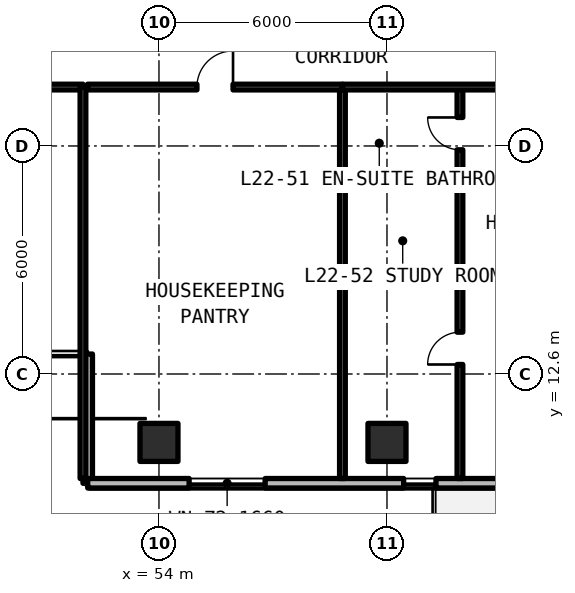
"""IFC4 building model, lengths in metres.
Left out: names, types, materials, properties, quantities, classifications, styles, units other than length and angle.
Written with IfcOpenShell. Run it as: python <this file> out.ifc"""

import sys

from ifc_helpers import new_model, si_unit, direction, frame, frame_2d, origin, origin_2d, place, context, subcontext, project, spatial, rectangle, extrude, element, fill, save


model = new_model("IFC4")
c1 = context("Model", 3, precision=1e-05, world=origin(), true_north=direction((0.0, 1.0)))
c2 = subcontext(c1, "Body", "Model", "MODEL_VIEW")
j1 = project(units=[si_unit("LENGTHUNIT", "METRE"), si_unit("PLANEANGLEUNIT", "RADIAN")], contexts=[c1])
p1 = place(None, origin())
s1 = spatial("IfcSite", under=j1, at=p1, CompositionType="ELEMENT")
p2 = place(p1, origin())
s2 = spatial("IfcBuilding", under=s1, at=p2, CompositionType="ELEMENT")
p3 = place(p2, frame((0.0, 0.0, 82.17)))
s3 = spatial("IfcBuildingStorey", under=s2, at=p3, CompositionType="ELEMENT", Elevation=82.17)
for number, where, z_axis, x_axis in (
    (1, (54.0, 10.8, 0.0), (0.0, 0.0, 1.0), (1.0, 0.0, 0.0)),
    (2, (60.0, 10.8, 0.0), (0.0, 0.0, 1.0), (1.0, 0.0, 0.0)),
):
    element("IfcColumn", number, at=place(p3, frame(where, z_axis=z_axis, x_axis=x_axis)), inside=s3, PredefinedType="COLUMN", context=c2, shape_type="SweptSolid", body=[
        extrude(rectangle(XDim=1.0, YDim=1.0, at=origin_2d()), origin(), (0.0, 0.0, 1.0), 3.3),
    ])
p4 = place(p3, frame((52.125, 13.125, 0.0), z_axis=(0.0, 0.0, 1.0), x_axis=(0.0, -1.0, 0.0)))
e3 = element("IfcWall", 3, at=p4, inside=s3, PredefinedType="SOLIDWALL", context=c2, shape_type="SweptSolid", body=[
    extrude(rectangle(XDim=3.4, YDim=0.25, at=frame_2d((1.7, 0.0))), origin(), (0.0, 0.0, 1.0), 3.08),
])
p5 = place(p3, frame((52.125, 9.725, 0.0), z_axis=(0.0, 0.0, 1.0), x_axis=(1.0, 0.0, 0.0)))
e4 = element("IfcWall", 4, at=p5, inside=s3, PredefinedType="SOLIDWALL", context=c2, shape_type="SweptSolid", body=[
    extrude(rectangle(XDim=44.023, YDim=0.25, at=frame_2d((22.012, 0.0))), origin(), (0.0, 0.0, 1.0), 3.08),
])
p6 = place(p5, frame((10.875, 0.0, 0.0)))
e5 = element("IfcOpeningElement", 5, at=p6, cuts=e4, PredefinedType="OPENING", context=c2, shape_type="SweptSolid", body=[
    extrude(rectangle(XDim=1.1, YDim=2.15, at=frame_2d((0.55, 1.075))), frame((0.0, 0.135, 0.0), z_axis=(0.0, -1.0, 0.0), x_axis=(1.0, 0.0, 0.0)), (0.0, 0.0, 1.0), 0.27),
])
p7 = place(p5, frame((22.975, 0.0, 0.0)))
e6 = element("IfcOpeningElement", 6, at=p7, cuts=e4, PredefinedType="OPENING", context=c2, shape_type="SweptSolid", body=[
    extrude(rectangle(XDim=1.1, YDim=2.15, at=frame_2d((0.55, 1.075))), frame((0.0, 0.135, 0.0), z_axis=(0.0, -1.0, 0.0), x_axis=(1.0, 0.0, 0.0)), (0.0, 0.0, 1.0), 0.27),
])
p8 = place(p5, frame((35.075, 0.0, 0.0)))
e7 = element("IfcOpeningElement", 7, at=p8, cuts=e4, PredefinedType="OPENING", context=c2, shape_type="SweptSolid", body=[
    extrude(rectangle(XDim=1.1, YDim=2.15, at=frame_2d((0.55, 1.075))), frame((0.0, 0.135, 0.0), z_axis=(0.0, -1.0, 0.0), x_axis=(1.0, 0.0, 0.0)), (0.0, 0.0, 1.0), 0.27),
])
p9 = place(p5, frame((2.669, 0.0, 0.78)))
e8 = element("IfcOpeningElement", 8, at=p9, cuts=e4, PredefinedType="OPENING", context=c2, shape_type="SweptSolid", body=[
    extrude(rectangle(XDim=2.0, YDim=1.66, at=frame_2d((1.0, 0.83))), frame((0.0, 0.135, 0.0), z_axis=(0.0, -1.0, 0.0), x_axis=(1.0, 0.0, 0.0)), (0.0, 0.0, 1.0), 0.27),
])
p10 = place(p5, frame((8.314, 0.0, 0.78)))
e9 = element("IfcOpeningElement", 9, at=p10, cuts=e4, PredefinedType="OPENING", context=c2, shape_type="SweptSolid", body=[
    extrude(rectangle(XDim=0.85, YDim=1.65, at=frame_2d((0.425, 0.825))), frame((0.0, 0.135, 0.0), z_axis=(0.0, -1.0, 0.0), x_axis=(1.0, 0.0, 0.0)), (0.0, 0.0, 1.0), 0.27),
])
p11 = place(p5, frame((27.363, 0.0, 0.78)))
e10 = element("IfcOpeningElement", 10, at=p11, cuts=e4, PredefinedType="OPENING", context=c2, shape_type="SweptSolid", body=[
    extrude(rectangle(XDim=2.0, YDim=1.66, at=frame_2d((1.0, 0.83))), frame((0.0, 0.135, 0.0), z_axis=(0.0, -1.0, 0.0), x_axis=(1.0, 0.0, 0.0)), (0.0, 0.0, 1.0), 0.27),
])
p12 = place(p5, frame((40.048, 0.0, 0.78)))
e11 = element("IfcOpeningElement", 11, at=p12, cuts=e4, PredefinedType="OPENING", context=c2, shape_type="SweptSolid", body=[
    extrude(rectangle(XDim=2.0, YDim=1.66, at=frame_2d((1.0, 0.83))), frame((0.0, 0.135, 0.0), z_axis=(0.0, -1.0, 0.0), x_axis=(1.0, 0.0, 0.0)), (0.0, 0.0, 1.0), 0.27),
])
p13 = place(p3, frame((43.6, 20.15, 0.0), z_axis=(0.0, 0.0, 1.0), x_axis=(1.0, 0.0, 0.0)))
e12 = element("IfcWall", 12, at=p13, inside=s3, PredefinedType="SOLIDWALL", context=c2, shape_type="SweptSolid", body=[
    extrude(rectangle(XDim=8.4, YDim=0.15, at=frame_2d((4.2, 0.0))), origin(), (0.0, 0.0, 1.0), 2.35),
])
p14 = place(p13, frame((3.65, 0.0, 0.0)))
e13 = element("IfcOpeningElement", 13, at=p14, cuts=e12, PredefinedType="OPENING", context=c2, shape_type="SweptSolid", body=[
    extrude(rectangle(XDim=1.1, YDim=2.15, at=frame_2d((0.55, 1.075))), frame((0.0, 0.085, 0.0), z_axis=(0.0, -1.0, 0.0), x_axis=(1.0, 0.0, 0.0)), (0.0, 0.0, 1.0), 0.17),
])
for number, where, z_axis, x_axis in (
    (14, (52.0, 9.85, 0.0), (0.0, 0.0, 1.0), (0.0, 1.0, 0.0)),
    (15, (58.828, 9.85, 0.0), (0.0, 0.0, 1.0), (0.0, 1.0, 0.0)),
):
    element("IfcWall", number, at=place(p3, frame(where, z_axis=z_axis, x_axis=x_axis)), inside=s3, PredefinedType="SOLIDWALL", context=c2, shape_type="SweptSolid", body=[
        extrude(rectangle(XDim=10.3, YDim=0.15, at=frame_2d((5.15, 0.0))), origin(), (0.0, 0.0, 1.0), 2.35),
    ])
p15 = place(p3, frame((52.12, 20.15, 0.0), z_axis=(0.0, 0.0, 1.0), x_axis=(1.0, 0.0, 0.0)))
e16 = element("IfcWall", 16, at=p15, inside=s3, PredefinedType="SOLIDWALL", context=c2, shape_type="SweptSolid", body=[
    extrude(rectangle(XDim=6.708, YDim=0.15, at=frame_2d((3.354, 0.0))), origin(), (0.0, 0.0, 1.0), 2.35),
])
p16 = place(p15, frame((2.879, 0.0, 0.0)))
e17 = element("IfcOpeningElement", 17, at=p16, cuts=e16, PredefinedType="OPENING", context=c2, shape_type="SweptSolid", body=[
    extrude(rectangle(XDim=0.95, YDim=2.15, at=frame_2d((0.475, 1.075))), frame((0.0, 0.085, 0.0), z_axis=(0.0, -1.0, 0.0), x_axis=(1.0, 0.0, 0.0)), (0.0, 0.0, 1.0), 0.17),
])
p17 = place(p3, frame((58.828, 17.7, 0.0), z_axis=(0.0, 0.0, 1.0), x_axis=(1.0, 0.0, 0.0)))
e18 = element("IfcWall", 18, at=p17, inside=s3, PredefinedType="PARTITIONING", context=c2, shape_type="SweptSolid", body=[
    extrude(rectangle(XDim=3.092, YDim=0.15, at=frame_2d((1.546, 0.0))), origin(), (0.0, 0.0, 1.0), 2.35),
])
p18 = place(p3, frame((61.92, 9.85, 0.0), z_axis=(0.0, 0.0, 1.0), x_axis=(0.0, 1.0, 0.0)))
e19 = element("IfcWall", 19, at=p18, inside=s3, PredefinedType="PARTITIONING", context=c2, shape_type="SweptSolid", body=[
    extrude(rectangle(XDim=10.3, YDim=0.15, at=frame_2d((5.15, 0.0))), origin(), (0.0, 0.0, 1.0), 2.35),
])
p19 = place(p18, frame((3.0, 0.0, 0.0)))
e20 = element("IfcOpeningElement", 20, at=p19, cuts=e19, PredefinedType="OPENING", context=c2, shape_type="SweptSolid", body=[
    extrude(rectangle(XDim=0.85, YDim=2.1, at=frame_2d((0.425, 1.05))), frame((0.0, 0.085, 0.0), z_axis=(0.0, -1.0, 0.0), x_axis=(1.0, 0.0, 0.0)), (0.0, 0.0, 1.0), 0.17),
])
p20 = place(p18, frame((8.65, 0.0, 0.0)))
e21 = element("IfcOpeningElement", 21, at=p20, cuts=e19, PredefinedType="OPENING", context=c2, shape_type="SweptSolid", body=[
    extrude(rectangle(XDim=0.85, YDim=2.1, at=frame_2d((0.425, 1.05))), frame((0.0, 0.085, 0.0), z_axis=(0.0, -1.0, 0.0), x_axis=(1.0, 0.0, 0.0)), (0.0, 0.0, 1.0), 0.17),
])
p21 = place(p3, frame((58.828, 20.15, 0.0), z_axis=(0.0, 0.0, 1.0), x_axis=(1.0, 0.0, 0.0)))
e22 = element("IfcWall", 22, at=p21, inside=s3, PredefinedType="SOLIDWALL", context=c2, shape_type="SweptSolid", body=[
    extrude(rectangle(XDim=7.826, YDim=0.15, at=frame_2d((3.913, 0.0))), origin(), (0.0, 0.0, 1.0), 2.35),
])
p22 = place(p21, frame((5.024, 0.0, 0.0)))
e23 = element("IfcOpeningElement", 23, at=p22, cuts=e22, PredefinedType="OPENING", context=c2, shape_type="SweptSolid", body=[
    extrude(rectangle(XDim=0.95, YDim=2.15, at=frame_2d((0.475, 1.075))), frame((0.0, 0.085, 0.0), z_axis=(0.0, -1.0, 0.0), x_axis=(1.0, 0.0, 0.0)), (0.0, 0.0, 1.0), 0.17),
])
p23 = place(p9, origin())
e24 = element("IfcWindow", 24, at=p23, inside=s3, PartitioningType="SINGLE_PANEL", PredefinedType="WINDOW", context=c2, shape_type="SweptSolid", body=[
    extrude(rectangle(XDim=2.0, YDim=1.66, at=frame_2d((1.0, 0.83))), frame((0.0, 0.03, 0.0), z_axis=(0.0, -1.0, 0.0), x_axis=(1.0, 0.0, 0.0)), (0.0, 0.0, 1.0), 0.06),
])
fill(e8, e24)
p24 = place(p10, origin())
e25 = element("IfcWindow", 25, at=p24, inside=s3, PartitioningType="SINGLE_PANEL", PredefinedType="WINDOW", context=c2, shape_type="SweptSolid", body=[
    extrude(rectangle(XDim=0.85, YDim=1.65, at=frame_2d((0.425, 0.825))), frame((0.0, 0.03, 0.0), z_axis=(0.0, -1.0, 0.0), x_axis=(1.0, 0.0, 0.0)), (0.0, 0.0, 1.0), 0.06),
])
fill(e9, e25)
p25 = place(p16, origin())
e26 = element("IfcDoor", 26, at=p25, inside=s3, OperationType="SINGLE_SWING_RIGHT", PredefinedType="DOOR", context=c2, shape_type="SweptSolid", body=[
    extrude(rectangle(XDim=0.95, YDim=2.15, at=frame_2d((0.475, 1.075))), frame((0.0, 0.025, 0.0), z_axis=(0.0, -1.0, 0.0), x_axis=(1.0, 0.0, 0.0)), (0.0, 0.0, 1.0), 0.05),
])
fill(e17, e26)
p26 = place(p19, origin())
e27 = element("IfcDoor", 27, at=p26, inside=s3, OperationType="SINGLE_SWING_LEFT", PredefinedType="DOOR", context=c2, shape_type="SweptSolid", body=[
    extrude(rectangle(XDim=0.85, YDim=2.1, at=frame_2d((0.425, 1.05))), frame((0.0, 0.025, 0.0), z_axis=(0.0, -1.0, 0.0), x_axis=(1.0, 0.0, 0.0)), (0.0, 0.0, 1.0), 0.05),
])
fill(e20, e27)
p27 = place(p20, origin())
e28 = element("IfcDoor", 28, at=p27, inside=s3, OperationType="SINGLE_SWING_RIGHT", PredefinedType="DOOR", context=c2, shape_type="SweptSolid", body=[
    extrude(rectangle(XDim=0.85, YDim=2.1, at=frame_2d((0.425, 1.05))), frame((0.0, 0.025, 0.0), z_axis=(0.0, -1.0, 0.0), x_axis=(1.0, 0.0, 0.0)), (0.0, 0.0, 1.0), 0.05),
])
fill(e21, e28)
save(model, sys.argv[1])
